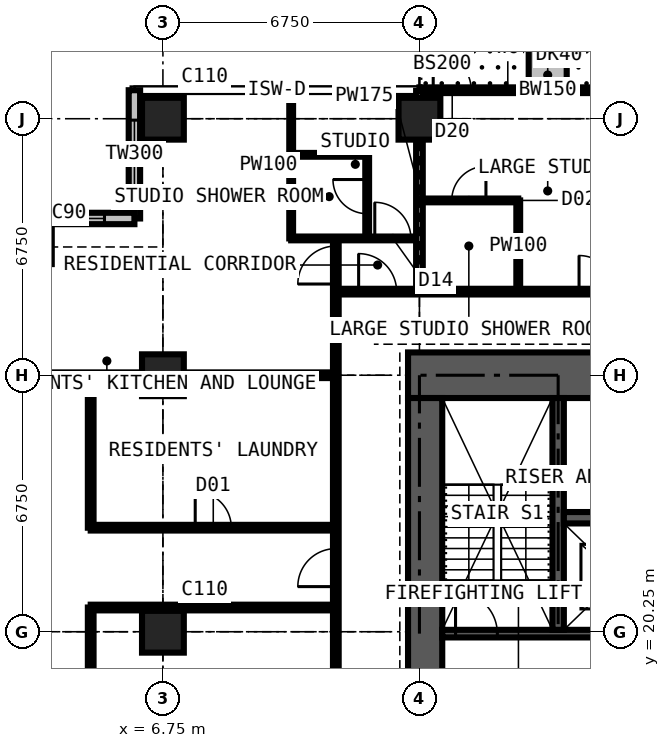
"""IFC4 building model, lengths in metres.
Left out: names, types, materials, properties, quantities, classifications, styles, units other than length and angle.
Written with IfcOpenShell. Run it as: python <this file> out.ifc"""

import sys

from ifc_helpers import new_model, si_unit, direction, frame, frame_2d, origin, origin_2d, place, context, subcontext, project, spatial, rectangle, extrude, element, fill, save


model = new_model("IFC4")
c1 = context("Model", 3, precision=1e-05, world=origin(), true_north=direction((0.0, 1.0)))
c2 = subcontext(c1, "Body", "Model", "MODEL_VIEW")
j1 = project(units=[si_unit("LENGTHUNIT", "METRE"), si_unit("PLANEANGLEUNIT", "RADIAN")], contexts=[c1])
p1 = place(None, origin())
s1 = spatial("IfcSite", under=j1, at=p1, CompositionType="ELEMENT")
p2 = place(p1, origin())
s2 = spatial("IfcBuilding", under=s1, at=p2, CompositionType="ELEMENT")
p3 = place(p2, frame((0.0, 0.0, 225.9)))
s3 = spatial("IfcBuildingStorey", under=s2, at=p3, CompositionType="ELEMENT", Elevation=225.9)
for number, where, z_axis, x_axis in (
    (1, (6.75, 20.25, 0.0), (0.0, 0.0, 1.0), (1.0, 0.0, 0.0)),
    (2, (6.75, 27.0, 0.0), (0.0, 0.0, 1.0), (1.0, 0.0, 0.0)),
    (3, (6.75, 33.75, 0.0), (0.0, 0.0, 1.0), (1.0, 0.0, 0.0)),
    (4, (13.5, 33.75, 0.0), (0.0, 0.0, 1.0), (1.0, 0.0, 0.0)),
):
    element("IfcColumn", number, at=place(p3, frame(where, z_axis=z_axis, x_axis=x_axis)), inside=s3, PredefinedType="COLUMN", context=c2, shape_type="SweptSolid", body=[
        extrude(rectangle(XDim=1.1, YDim=1.1, at=origin_2d()), origin(), (0.0, 0.0, 1.0), 3.6),
    ])
p4 = place(p3, frame((27.3, 27.0, 0.0), z_axis=(0.0, 0.0, 1.0), x_axis=(-1.0, 0.0, 0.0)))
e5 = element("IfcWall", 5, at=p4, inside=s3, PredefinedType="SHEAR", context=c2, shape_type="SweptSolid", body=[
    extrude(rectangle(XDim=14.1, YDim=1.2, at=frame_2d((7.05, 0.0))), origin(), (0.0, 0.0, 1.0), 3.6),
])
p5 = place(p4, frame((4.55, 0.0, 0.0)))
e6 = element("IfcOpeningElement", 6, at=p5, cuts=e5, PredefinedType="OPENING", context=c2, shape_type="SweptSolid", body=[
    extrude(rectangle(XDim=0.9, YDim=2.2, at=frame_2d((0.45, 1.1))), frame((0.0, 0.61, 0.0), z_axis=(0.0, -1.0, 0.0), x_axis=(1.0, 0.0, 0.0)), (0.0, 0.0, 1.0), 1.22),
])
p6 = place(p4, frame((7.525, 0.0, 0.0)))
e7 = element("IfcOpeningElement", 7, at=p6, cuts=e5, PredefinedType="OPENING", context=c2, shape_type="SweptSolid", body=[
    extrude(rectangle(XDim=1.0, YDim=2.2, at=frame_2d((0.5, 1.1))), frame((0.0, 0.61, 0.0), z_axis=(0.0, -1.0, 0.0), x_axis=(1.0, 0.0, 0.0)), (0.0, 0.0, 1.0), 1.22),
])
p7 = place(p3, frame((13.65, 26.4, 0.0), z_axis=(0.0, 0.0, 1.0), x_axis=(0.0, -1.0, 0.0)))
e8 = element("IfcWall", 8, at=p7, inside=s3, PredefinedType="SHEAR", context=c2, shape_type="SweptSolid", body=[
    extrude(rectangle(XDim=12.3, YDim=0.9, at=frame_2d((6.15, 0.0))), origin(), (0.0, 0.0, 1.0), 3.6),
])
p8 = place(p7, frame((7.45, 0.0, 0.0)))
e9 = element("IfcOpeningElement", 9, at=p8, cuts=e8, PredefinedType="OPENING", context=c2, shape_type="SweptSolid", body=[
    extrude(rectangle(XDim=1.2, YDim=2.2, at=frame_2d((0.6, 1.1))), frame((0.0, 0.46, 0.0), z_axis=(0.0, -1.0, 0.0), x_axis=(1.0, 0.0, 0.0)), (0.0, 0.0, 1.0), 0.92),
])
p9 = place(p3, frame((13.5, 34.5, 0.0), z_axis=(0.0, 0.0, 1.0), x_axis=(1.0, 0.0, 0.0)))
e10 = element("IfcWall", 10, at=p9, inside=s3, PredefinedType="SOLIDWALL", context=c2, shape_type="SweptSolid", body=[
    extrude(rectangle(XDim=6.75, YDim=0.15, at=frame_2d((3.375, 0.0))), origin(), (0.0, 0.0, 1.0), 3.375),
])
p10 = place(p9, frame((0.363, 0.0, 0.0)))
e11 = element("IfcOpeningElement", 11, at=p10, cuts=e10, PredefinedType="OPENING", context=c2, shape_type="SweptSolid", body=[
    extrude(rectangle(XDim=1.0, YDim=2.2, at=frame_2d((0.5, 1.1))), frame((0.0, 0.085, 0.0), z_axis=(0.0, -1.0, 0.0), x_axis=(1.0, 0.0, 0.0)), (0.0, 0.0, 1.0), 0.17),
])
p11 = place(p9, frame((1.725, 0.0, 0.9)))
e12 = element("IfcOpeningElement", 12, at=p11, cuts=e10, PredefinedType="OPENING", context=c2, shape_type="SweptSolid", body=[
    extrude(rectangle(XDim=1.2, YDim=1.8, at=frame_2d((0.6, 0.9))), frame((0.0, 0.085, 0.0), z_axis=(0.0, -1.0, 0.0), x_axis=(1.0, 0.0, 0.0)), (0.0, 0.0, 1.0), 0.17),
])
p12 = place(p9, frame((5.387, 0.0, 0.0)))
e13 = element("IfcOpeningElement", 13, at=p12, cuts=e10, PredefinedType="OPENING", context=c2, shape_type="SweptSolid", body=[
    extrude(rectangle(XDim=1.0, YDim=2.2, at=frame_2d((0.5, 1.1))), frame((0.0, 0.085, 0.0), z_axis=(0.0, -1.0, 0.0), x_axis=(1.0, 0.0, 0.0)), (0.0, 0.0, 1.0), 0.17),
])
p13 = place(p9, frame((3.825, 0.0, 0.9)))
e14 = element("IfcOpeningElement", 14, at=p13, cuts=e10, PredefinedType="OPENING", context=c2, shape_type="SweptSolid", body=[
    extrude(rectangle(XDim=1.2, YDim=1.8, at=frame_2d((0.6, 0.9))), frame((0.0, 0.085, 0.0), z_axis=(0.0, -1.0, 0.0), x_axis=(1.0, 0.0, 0.0)), (0.0, 0.0, 1.0), 0.17),
])
p14 = place(p3, frame((6.0, 34.5, 0.0), z_axis=(0.0, 0.0, 1.0), x_axis=(0.0, -1.0, 0.0)))
e15 = element("IfcWall", 15, at=p14, inside=s3, PredefinedType="SOLIDWALL", context=c2, shape_type="SweptSolid", body=[
    extrude(rectangle(XDim=3.375, YDim=0.3, at=frame_2d((1.688, 0.0))), origin(), (0.0, 0.0, 1.0), 3.375),
])
p15 = place(p14, frame((0.788, 0.0, 0.6)))
e16 = element("IfcOpeningElement", 16, at=p15, cuts=e15, PredefinedType="OPENING", context=c2, shape_type="SweptSolid", body=[
    extrude(rectangle(XDim=1.8, YDim=2.1, at=frame_2d((0.9, 1.05))), frame((0.0, 0.16, 0.0), z_axis=(0.0, -1.0, 0.0), x_axis=(1.0, 0.0, 0.0)), (0.0, 0.0, 1.0), 0.32),
])
p16 = place(p3, frame((6.0, 31.125, 0.0), z_axis=(0.0, 0.0, 1.0), x_axis=(-1.0, 0.0, 0.0)))
e17 = element("IfcWall", 17, at=p16, inside=s3, PredefinedType="SOLIDWALL", context=c2, shape_type="SweptSolid", body=[
    extrude(rectangle(XDim=3.375, YDim=0.3, at=frame_2d((1.688, 0.0))), origin(), (0.0, 0.0, 1.0), 3.375),
])
p17 = place(p16, frame((0.788, 0.0, 0.6)))
e18 = element("IfcOpeningElement", 18, at=p17, cuts=e17, PredefinedType="OPENING", context=c2, shape_type="SweptSolid", body=[
    extrude(rectangle(XDim=1.8, YDim=2.1, at=frame_2d((0.9, 1.05))), frame((0.0, 0.16, 0.0), z_axis=(0.0, -1.0, 0.0), x_axis=(1.0, 0.0, 0.0)), (0.0, 0.0, 1.0), 0.32),
])
p18 = place(p3, frame((16.875, 34.6, 0.0), z_axis=(0.0, 0.0, 1.0), x_axis=(0.0, 1.0, 0.0)))
e19 = element("IfcWall", 19, at=p18, inside=s3, PredefinedType="USERDEFINED", context=c2, shape_type="SweptSolid", body=[
    extrude(rectangle(XDim=2.2, YDim=1.0, at=frame_2d((1.1, 0.0))), origin(), (0.0, 0.0, 1.0), 0.9),
])
p19 = place(p3, frame((14.1, 20.2, 0.0), z_axis=(0.0, 0.0, 1.0), x_axis=(1.0, 0.0, 0.0)))
e20 = element("IfcWall", 20, at=p19, inside=s3, PredefinedType="SHEAR", context=c2, shape_type="SweptSolid", body=[
    extrude(rectangle(XDim=12.3, YDim=0.2, at=frame_2d((6.15, 0.0))), origin(), (0.0, 0.0, 1.0), 3.6),
])
p20 = place(p19, frame((4.56, 0.0, 0.0)))
e21 = element("IfcOpeningElement", 21, at=p20, cuts=e20, PredefinedType="OPENING", context=c2, shape_type="SweptSolid", body=[
    extrude(rectangle(XDim=1.1, YDim=2.2, at=frame_2d((0.55, 1.1))), frame((0.0, 0.11, 0.0), z_axis=(0.0, -1.0, 0.0), x_axis=(1.0, 0.0, 0.0)), (0.0, 0.0, 1.0), 0.22),
])
p21 = place(p19, frame((6.7, 0.0, 0.0)))
e22 = element("IfcOpeningElement", 22, at=p21, cuts=e20, PredefinedType="OPENING", context=c2, shape_type="SweptSolid", body=[
    extrude(rectangle(XDim=1.1, YDim=2.2, at=frame_2d((0.55, 1.1))), frame((0.0, 0.11, 0.0), z_axis=(0.0, -1.0, 0.0), x_axis=(1.0, 0.0, 0.0)), (0.0, 0.0, 1.0), 0.22),
])
p22 = place(p19, frame((0.35, 0.0, 0.0)))
e23 = element("IfcOpeningElement", 23, at=p22, cuts=e20, PredefinedType="OPENING", context=c2, shape_type="SweptSolid", body=[
    extrude(rectangle(XDim=1.1, YDim=2.2, at=frame_2d((0.55, 1.1))), frame((0.0, 0.11, 0.0), z_axis=(0.0, -1.0, 0.0), x_axis=(1.0, 0.0, 0.0)), (0.0, 0.0, 1.0), 0.22),
])
p23 = place(p19, frame((9.75, 0.0, 0.0)))
e24 = element("IfcOpeningElement", 24, at=p23, cuts=e20, PredefinedType="OPENING", context=c2, shape_type="SweptSolid", body=[
    extrude(rectangle(XDim=1.1, YDim=2.2, at=frame_2d((0.55, 1.1))), frame((0.0, 0.11, 0.0), z_axis=(0.0, -1.0, 0.0), x_axis=(1.0, 0.0, 0.0)), (0.0, 0.0, 1.0), 0.22),
])
p24 = place(p3, frame((17.15, 20.3, 0.0), z_axis=(0.0, 0.0, 1.0), x_axis=(0.0, 1.0, 0.0)))
e25 = element("IfcWall", 25, at=p24, inside=s3, PredefinedType="SHEAR", context=c2, shape_type="SweptSolid", body=[
    extrude(rectangle(XDim=6.1, YDim=0.3, at=frame_2d((3.05, 0.0))), origin(), (0.0, 0.0, 1.0), 3.6),
])
p25 = place(p3, frame((17.3, 23.25, 0.0), z_axis=(0.0, 0.0, 1.0), x_axis=(1.0, 0.0, 0.0)))
e26 = element("IfcWall", 26, at=p25, inside=s3, PredefinedType="SHEAR", context=c2, shape_type="SweptSolid", body=[
    extrude(rectangle(XDim=5.9, YDim=0.3, at=frame_2d((2.95, 0.0))), origin(), (0.0, 0.0, 1.0), 3.6),
])
p26 = place(p3, frame((3.35, 27.0, 0.0), z_axis=(0.0, 0.0, 1.0), x_axis=(1.0, 0.0, 0.0)))
e27 = element("IfcWall", 27, at=p26, inside=s3, PredefinedType="PARTITIONING", context=c2, shape_type="SweptSolid", body=[
    extrude(rectangle(XDim=7.95, YDim=0.15, at=frame_2d((3.975, 0.0))), origin(), (0.0, 0.0, 1.0), 2.877),
])
p27 = place(p3, frame((4.85, 12.775, 0.0), z_axis=(0.0, 0.0, 1.0), x_axis=(0.0, 1.0, 0.0)))
e28 = element("IfcWall", 28, at=p27, inside=s3, PredefinedType="PARTITIONING", context=c2, shape_type="SweptSolid", body=[
    extrude(rectangle(XDim=8.113, YDim=0.15, at=frame_2d((4.056, 0.0))), origin(), (0.0, 0.0, 1.0), 3.375),
])
p28 = place(p27, frame((3.6, 0.0, 0.0)))
e29 = element("IfcOpeningElement", 29, at=p28, cuts=e28, PredefinedType="OPENING", context=c2, shape_type="SweptSolid", body=[
    extrude(rectangle(XDim=0.95, YDim=2.2, at=frame_2d((0.475, 1.1))), frame((0.0, 0.085, 0.0), z_axis=(0.0, -1.0, 0.0), x_axis=(1.0, 0.0, 0.0)), (0.0, 0.0, 1.0), 0.17),
])
p29 = place(p3, frame((4.85, 20.887, 0.0), z_axis=(0.0, 0.0, 1.0), x_axis=(1.0, 0.0, 0.0)))
e30 = element("IfcWall", 30, at=p29, inside=s3, PredefinedType="PARTITIONING", context=c2, shape_type="SweptSolid", body=[
    extrude(rectangle(XDim=6.45, YDim=0.15, at=frame_2d((3.225, 0.0))), origin(), (0.0, 0.0, 1.0), 3.375),
])
p30 = place(p3, frame((4.85, 22.988, 0.0), z_axis=(0.0, 0.0, 1.0), x_axis=(0.0, 1.0, 0.0)))
e31 = element("IfcWall", 31, at=p30, inside=s3, PredefinedType="PARTITIONING", context=c2, shape_type="SweptSolid", body=[
    extrude(rectangle(XDim=4.012, YDim=0.15, at=frame_2d((2.006, 0.0))), origin(), (0.0, 0.0, 1.0), 3.375),
])
p31 = place(p3, frame((4.85, 22.988, 0.0), z_axis=(0.0, 0.0, 1.0), x_axis=(1.0, 0.0, 0.0)))
e32 = element("IfcWall", 32, at=p31, inside=s3, PredefinedType="PARTITIONING", context=c2, shape_type="SweptSolid", body=[
    extrude(rectangle(XDim=6.45, YDim=0.15, at=frame_2d((3.225, 0.0))), origin(), (0.0, 0.0, 1.0), 3.375),
])
p32 = place(p31, frame((2.75, 0.0, 0.0)))
e33 = element("IfcOpeningElement", 33, at=p32, cuts=e32, PredefinedType="OPENING", context=c2, shape_type="SweptSolid", body=[
    extrude(rectangle(XDim=0.95, YDim=2.2, at=frame_2d((0.475, 1.1))), frame((0.0, 0.085, 0.0), z_axis=(0.0, -1.0, 0.0), x_axis=(1.0, 0.0, 0.0)), (0.0, 0.0, 1.0), 0.17),
])
p33 = place(p3, frame((10.125, 30.6, 0.0), z_axis=(0.0, 0.0, 1.0), x_axis=(0.0, 1.0, 0.0)))
e34 = element("IfcWall", 34, at=p33, inside=s3, PredefinedType="PARTITIONING", context=c2, shape_type="SweptSolid", body=[
    extrude(rectangle(XDim=3.884, YDim=0.1, at=frame_2d((1.942, 0.0))), origin(), (0.0, 0.0, 1.0), 3.375),
])
p34 = place(p3, frame((10.125, 30.6, 0.0), z_axis=(0.0, 0.0, 1.0), x_axis=(1.0, 0.0, 0.0)))
e35 = element("IfcWall", 35, at=p34, inside=s3, PredefinedType="PARTITIONING", context=c2, shape_type="SweptSolid", body=[
    extrude(rectangle(XDim=3.375, YDim=0.1, at=frame_2d((1.688, 0.0))), origin(), (0.0, 0.0, 1.0), 3.375),
])
p35 = place(p34, frame((2.2, 0.0, 0.0)))
e36 = element("IfcOpeningElement", 36, at=p35, cuts=e35, PredefinedType="OPENING", context=c2, shape_type="SweptSolid", body=[
    extrude(rectangle(XDim=0.95, YDim=2.2, at=frame_2d((0.475, 1.1))), frame((0.0, 0.06, 0.0), z_axis=(0.0, -1.0, 0.0), x_axis=(1.0, 0.0, 0.0)), (0.0, 0.0, 1.0), 0.12),
])
p36 = place(p3, frame((10.125, 32.8, 0.0), z_axis=(0.0, 0.0, 1.0), x_axis=(1.0, 0.0, 0.0)))
e37 = element("IfcWall", 37, at=p36, inside=s3, PredefinedType="PARTITIONING", context=c2, shape_type="SweptSolid", body=[
    extrude(rectangle(XDim=2.0, YDim=0.1, at=frame_2d((1.0, 0.0))), origin(), (0.0, 0.0, 1.0), 3.375),
])
p37 = place(p3, frame((11.3, 11.3, 0.0), z_axis=(0.0, 0.0, 1.0), x_axis=(0.0, 1.0, 0.0)))
e38 = element("IfcWall", 38, at=p37, inside=s3, PredefinedType="PARTITIONING", context=c2, shape_type="SweptSolid", body=[
    extrude(rectangle(XDim=19.3, YDim=0.15, at=frame_2d((9.65, 0.0))), origin(), (0.0, 0.0, 1.0), 3.375),
])
p38 = place(p37, frame((18.1, 0.0, 0.0)))
e39 = element("IfcOpeningElement", 39, at=p38, cuts=e38, PredefinedType="OPENING", context=c2, shape_type="SweptSolid", body=[
    extrude(rectangle(XDim=1.0, YDim=2.2, at=frame_2d((0.5, 1.1))), frame((0.0, 0.085, 0.0), z_axis=(0.0, -1.0, 0.0), x_axis=(1.0, 0.0, 0.0)), (0.0, 0.0, 1.0), 0.17),
])
p39 = place(p37, frame((10.137, 0.0, 0.0)))
e40 = element("IfcOpeningElement", 40, at=p39, cuts=e38, PredefinedType="OPENING", context=c2, shape_type="SweptSolid", body=[
    extrude(rectangle(XDim=1.0, YDim=2.2, at=frame_2d((0.5, 1.1))), frame((0.0, 0.085, 0.0), z_axis=(0.0, -1.0, 0.0), x_axis=(1.0, 0.0, 0.0)), (0.0, 0.0, 1.0), 0.17),
])
p40 = place(p3, frame((11.3, 29.2, 0.0), z_axis=(0.0, 0.0, 1.0), x_axis=(1.0, 0.0, 0.0)))
e41 = element("IfcWall", 41, at=p40, inside=s3, PredefinedType="PARTITIONING", context=c2, shape_type="SweptSolid", body=[
    extrude(rectangle(XDim=19.809, YDim=0.15, at=frame_2d((9.904, 0.0))), origin(), (0.0, 0.0, 1.0), 3.375),
])
p41 = place(p40, frame((14.625, 0.0, 0.0)))
e42 = element("IfcOpeningElement", 42, at=p41, cuts=e41, PredefinedType="OPENING", context=c2, shape_type="SweptSolid", body=[
    extrude(rectangle(XDim=1.0, YDim=2.2, at=frame_2d((0.5, 1.1))), frame((0.0, 0.085, 0.0), z_axis=(0.0, -1.0, 0.0), x_axis=(1.0, 0.0, 0.0)), (0.0, 0.0, 1.0), 0.17),
])
p42 = place(p40, frame((6.4, 0.0, 0.0)))
e43 = element("IfcOpeningElement", 43, at=p42, cuts=e41, PredefinedType="OPENING", context=c2, shape_type="SweptSolid", body=[
    extrude(rectangle(XDim=0.95, YDim=2.2, at=frame_2d((0.475, 1.1))), frame((0.0, 0.085, 0.0), z_axis=(0.0, -1.0, 0.0), x_axis=(1.0, 0.0, 0.0)), (0.0, 0.0, 1.0), 0.17),
])
p43 = place(p40, frame((9.2, 0.0, 0.0)))
e44 = element("IfcOpeningElement", 44, at=p43, cuts=e41, PredefinedType="OPENING", context=c2, shape_type="SweptSolid", body=[
    extrude(rectangle(XDim=0.95, YDim=2.2, at=frame_2d((0.475, 1.1))), frame((0.0, 0.085, 0.0), z_axis=(0.0, -1.0, 0.0), x_axis=(1.0, 0.0, 0.0)), (0.0, 0.0, 1.0), 0.17),
])
p44 = place(p40, frame((0.6, 0.0, 0.0)))
e45 = element("IfcOpeningElement", 45, at=p44, cuts=e41, PredefinedType="OPENING", context=c2, shape_type="SweptSolid", body=[
    extrude(rectangle(XDim=1.0, YDim=2.2, at=frame_2d((0.5, 1.1))), frame((0.0, 0.085, 0.0), z_axis=(0.0, -1.0, 0.0), x_axis=(1.0, 0.0, 0.0)), (0.0, 0.0, 1.0), 0.17),
])
p45 = place(p3, frame((12.125, 30.6, 0.0), z_axis=(0.0, 0.0, 1.0), x_axis=(0.0, 1.0, 0.0)))
e46 = element("IfcWall", 46, at=p45, inside=s3, PredefinedType="PARTITIONING", context=c2, shape_type="SweptSolid", body=[
    extrude(rectangle(XDim=2.2, YDim=0.1, at=frame_2d((1.1, 0.0))), origin(), (0.0, 0.0, 1.0), 3.375),
])
p46 = place(p45, frame((0.65, 0.0, 0.0)))
e47 = element("IfcOpeningElement", 47, at=p46, cuts=e46, PredefinedType="OPENING", context=c2, shape_type="SweptSolid", body=[
    extrude(rectangle(XDim=0.9, YDim=2.2, at=frame_2d((0.45, 1.1))), frame((0.0, 0.06, 0.0), z_axis=(0.0, -1.0, 0.0), x_axis=(1.0, 0.0, 0.0)), (0.0, 0.0, 1.0), 0.12),
])
p47 = place(p3, frame((13.5, 29.2, 0.0), z_axis=(0.0, 0.0, 1.0), x_axis=(0.0, 1.0, 0.0)))
e48 = element("IfcWall", 48, at=p47, inside=s3, PredefinedType="PARTITIONING", context=c2, shape_type="SweptSolid", body=[
    extrude(rectangle(XDim=5.284, YDim=0.175, at=frame_2d((2.642, 0.0))), origin(), (0.0, 0.0, 1.0), 2.877),
])
p48 = place(p3, frame((13.5, 31.6, 0.0), z_axis=(0.0, 0.0, 1.0), x_axis=(1.0, 0.0, 0.0)))
e49 = element("IfcWall", 49, at=p48, inside=s3, PredefinedType="PARTITIONING", context=c2, shape_type="SweptSolid", body=[
    extrude(rectangle(XDim=2.6, YDim=0.1, at=frame_2d((1.3, 0.0))), origin(), (0.0, 0.0, 1.0), 3.375),
])
p49 = place(p48, frame((0.85, 0.0, 0.0)))
e50 = element("IfcOpeningElement", 50, at=p49, cuts=e49, PredefinedType="OPENING", context=c2, shape_type="SweptSolid", body=[
    extrude(rectangle(XDim=0.9, YDim=2.2, at=frame_2d((0.45, 1.1))), frame((0.0, 0.06, 0.0), z_axis=(0.0, -1.0, 0.0), x_axis=(1.0, 0.0, 0.0)), (0.0, 0.0, 1.0), 0.12),
])
p50 = place(p3, frame((16.1, 29.2, 0.0), z_axis=(0.0, 0.0, 1.0), x_axis=(0.0, 1.0, 0.0)))
e51 = element("IfcWall", 51, at=p50, inside=s3, PredefinedType="PARTITIONING", context=c2, shape_type="SweptSolid", body=[
    extrude(rectangle(XDim=2.4, YDim=0.1, at=frame_2d((1.2, 0.0))), origin(), (0.0, 0.0, 1.0), 3.375),
])
p51 = place(p10, origin())
e52 = element("IfcDoor", 52, at=p51, inside=s3, OperationType="SINGLE_SWING_LEFT", PredefinedType="DOOR", context=c2, shape_type="SweptSolid", body=[
    extrude(rectangle(XDim=1.0, YDim=2.2, at=frame_2d((0.5, 1.1))), frame((0.0, 0.025, 0.0), z_axis=(0.0, -1.0, 0.0), x_axis=(1.0, 0.0, 0.0)), (0.0, 0.0, 1.0), 0.05),
])
fill(e11, e52)
p52 = place(p11, origin())
e53 = element("IfcWindow", 53, at=p52, inside=s3, PartitioningType="SINGLE_PANEL", PredefinedType="WINDOW", context=c2, shape_type="SweptSolid", body=[
    extrude(rectangle(XDim=1.2, YDim=1.8, at=frame_2d((0.6, 0.9))), frame((0.0, 0.03, 0.0), z_axis=(0.0, -1.0, 0.0), x_axis=(1.0, 0.0, 0.0)), (0.0, 0.0, 1.0), 0.06),
])
fill(e12, e53)
p53 = place(p13, origin())
e54 = element("IfcWindow", 54, at=p53, inside=s3, PartitioningType="SINGLE_PANEL", PredefinedType="WINDOW", context=c2, shape_type="SweptSolid", body=[
    extrude(rectangle(XDim=1.2, YDim=1.8, at=frame_2d((0.6, 0.9))), frame((0.0, 0.03, 0.0), z_axis=(0.0, -1.0, 0.0), x_axis=(1.0, 0.0, 0.0)), (0.0, 0.0, 1.0), 0.06),
])
fill(e14, e54)
p54 = place(p15, origin())
e55 = element("IfcWindow", 55, at=p54, inside=s3, PartitioningType="SINGLE_PANEL", PredefinedType="WINDOW", context=c2, shape_type="SweptSolid", body=[
    extrude(rectangle(XDim=1.8, YDim=2.1, at=frame_2d((0.9, 1.05))), frame((0.0, 0.03, 0.0), z_axis=(0.0, -1.0, 0.0), x_axis=(1.0, 0.0, 0.0)), (0.0, 0.0, 1.0), 0.06),
])
fill(e16, e55)
p55 = place(p17, origin())
e56 = element("IfcWindow", 56, at=p55, inside=s3, PartitioningType="SINGLE_PANEL", PredefinedType="WINDOW", context=c2, shape_type="SweptSolid", body=[
    extrude(rectangle(XDim=1.8, YDim=2.1, at=frame_2d((0.9, 1.05))), frame((0.0, 0.03, 0.0), z_axis=(0.0, -1.0, 0.0), x_axis=(1.0, 0.0, 0.0)), (0.0, 0.0, 1.0), 0.06),
])
fill(e18, e56)
p56 = place(p22, origin())
e57 = element("IfcDoor", 57, at=p56, inside=s3, OperationType="SINGLE_SWING_LEFT", PredefinedType="DOOR", context=c2, shape_type="SweptSolid", body=[
    extrude(rectangle(XDim=1.1, YDim=2.2, at=frame_2d((0.55, 1.1))), frame((0.0, 0.025, 0.0), z_axis=(0.0, -1.0, 0.0), x_axis=(1.0, 0.0, 0.0)), (0.0, 0.0, 1.0), 0.05),
])
fill(e23, e57)
p57 = place(p42, origin())
e58 = element("IfcDoor", 58, at=p57, inside=s3, OperationType="SINGLE_SWING_LEFT", PredefinedType="DOOR", context=c2, shape_type="SweptSolid", body=[
    extrude(rectangle(XDim=0.95, YDim=2.2, at=frame_2d((0.475, 1.1))), frame((0.0, 0.025, 0.0), z_axis=(0.0, -1.0, 0.0), x_axis=(1.0, 0.0, 0.0)), (0.0, 0.0, 1.0), 0.05),
])
fill(e43, e58)
p58 = place(p49, origin())
e59 = element("IfcDoor", 59, at=p58, inside=s3, OperationType="SINGLE_SWING_RIGHT", PredefinedType="DOOR", context=c2, shape_type="SweptSolid", body=[
    extrude(rectangle(XDim=0.9, YDim=2.2, at=frame_2d((0.45, 1.1))), frame((0.0, 0.025, 0.0), z_axis=(0.0, -1.0, 0.0), x_axis=(1.0, 0.0, 0.0)), (0.0, 0.0, 1.0), 0.05),
])
fill(e50, e59)
p59 = place(p35, origin())
e60 = element("IfcDoor", 60, at=p59, inside=s3, OperationType="SINGLE_SWING_LEFT", PredefinedType="DOOR", context=c2, shape_type="SweptSolid", body=[
    extrude(rectangle(XDim=0.95, YDim=2.2, at=frame_2d((0.475, 1.1))), frame((0.0, 0.025, 0.0), z_axis=(0.0, -1.0, 0.0), x_axis=(1.0, 0.0, 0.0)), (0.0, 0.0, 1.0), 0.05),
])
fill(e36, e60)
p60 = place(p46, origin())
e61 = element("IfcDoor", 61, at=p60, inside=s3, OperationType="SINGLE_SWING_RIGHT", PredefinedType="DOOR", context=c2, shape_type="SweptSolid", body=[
    extrude(rectangle(XDim=0.9, YDim=2.2, at=frame_2d((0.45, 1.1))), frame((0.0, 0.025, 0.0), z_axis=(0.0, -1.0, 0.0), x_axis=(1.0, 0.0, 0.0)), (0.0, 0.0, 1.0), 0.05),
])
fill(e47, e61)
p61 = place(p44, origin())
e62 = element("IfcDoor", 62, at=p61, inside=s3, OperationType="SINGLE_SWING_LEFT", PredefinedType="DOOR", context=c2, shape_type="SweptSolid", body=[
    extrude(rectangle(XDim=1.0, YDim=2.2, at=frame_2d((0.5, 1.1))), frame((0.0, 0.025, 0.0), z_axis=(0.0, -1.0, 0.0), x_axis=(1.0, 0.0, 0.0)), (0.0, 0.0, 1.0), 0.05),
])
fill(e45, e62)
p62 = place(p38, origin())
e63 = element("IfcDoor", 63, at=p62, inside=s3, OperationType="SINGLE_SWING_LEFT", PredefinedType="DOOR", context=c2, shape_type="SweptSolid", body=[
    extrude(rectangle(XDim=1.0, YDim=2.2, at=frame_2d((0.5, 1.1))), frame((0.0, 0.025, 0.0), z_axis=(0.0, -1.0, 0.0), x_axis=(1.0, 0.0, 0.0)), (0.0, 0.0, 1.0), 0.05),
])
fill(e39, e63)
p63 = place(p39, origin())
e64 = element("IfcDoor", 64, at=p63, inside=s3, OperationType="SINGLE_SWING_LEFT", PredefinedType="DOOR", context=c2, shape_type="SweptSolid", body=[
    extrude(rectangle(XDim=1.0, YDim=2.2, at=frame_2d((0.5, 1.1))), frame((0.0, 0.025, 0.0), z_axis=(0.0, -1.0, 0.0), x_axis=(1.0, 0.0, 0.0)), (0.0, 0.0, 1.0), 0.05),
])
fill(e40, e64)
p64 = place(p32, origin())
e65 = element("IfcDoor", 65, at=p64, inside=s3, OperationType="SINGLE_SWING_LEFT", PredefinedType="DOOR", context=c2, shape_type="SweptSolid", body=[
    extrude(rectangle(XDim=0.95, YDim=2.2, at=frame_2d((0.475, 1.1))), frame((0.0, 0.025, 0.0), z_axis=(0.0, -1.0, 0.0), x_axis=(1.0, 0.0, 0.0)), (0.0, 0.0, 1.0), 0.05),
])
fill(e33, e65)
save(model, sys.argv[1])
